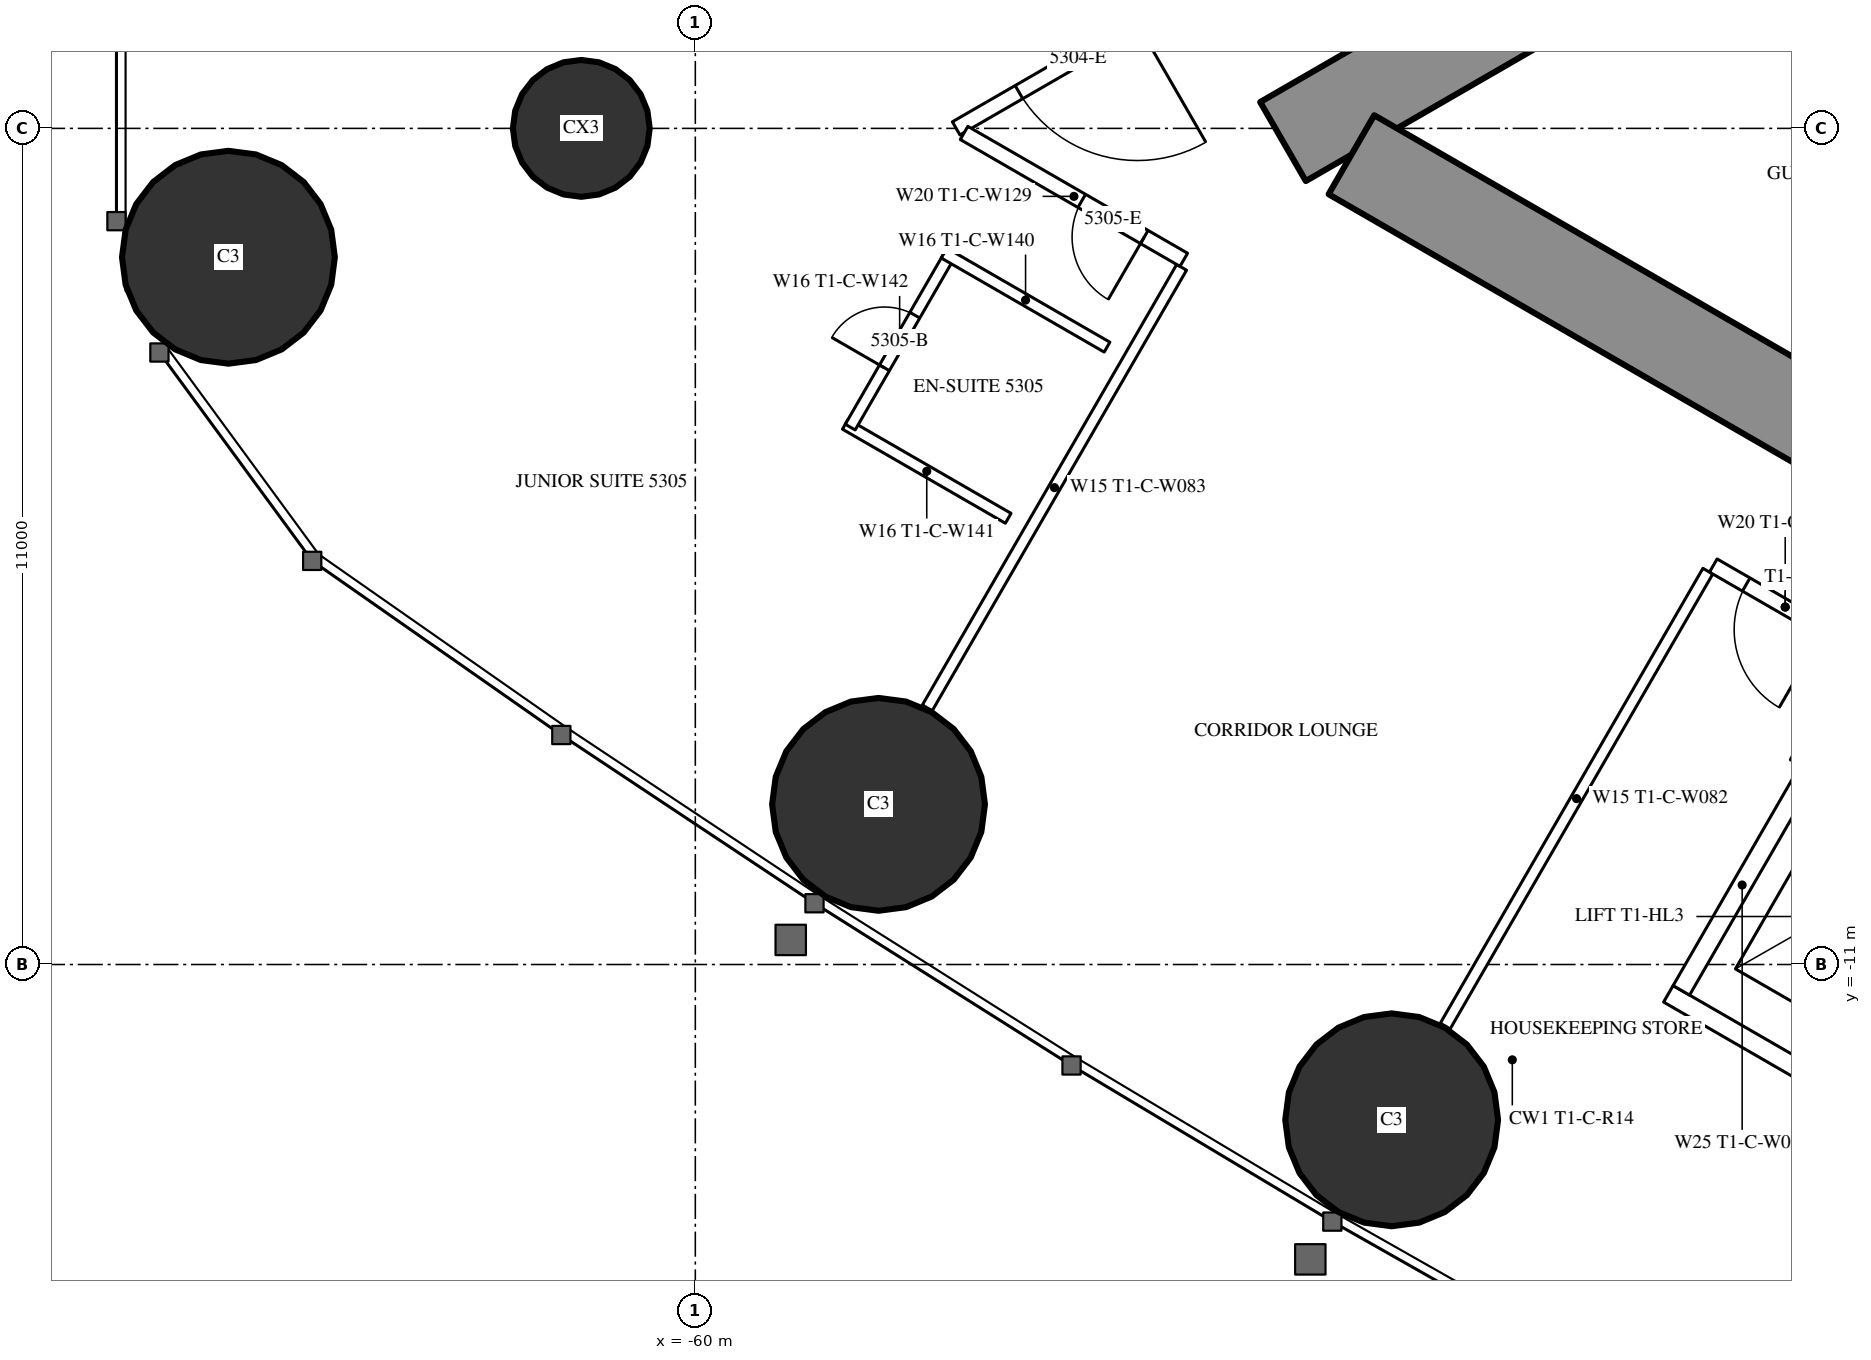
"""IFC4 building model, lengths in metres.
Left out: names, types, materials, properties, quantities, classifications, styles, units other than length and angle.
Written with IfcOpenShell. Run it as: python <this file> out.ifc"""

import sys

from ifc_helpers import new_model, si_unit, direction, frame, frame_2d, origin, origin_2d, place, context, subcontext, project, spatial, rectangle, circle, extrude, element, fill, save


model = new_model("IFC4")
c1 = context("Model", 3, precision=1e-05, world=origin(), true_north=direction((0.0, 1.0)))
c2 = subcontext(c1, "Body", "Model", "MODEL_VIEW")
j1 = project(units=[si_unit("LENGTHUNIT", "METRE"), si_unit("PLANEANGLEUNIT", "RADIAN")], contexts=[c1])
p1 = place(None, origin())
s1 = spatial("IfcSite", under=j1, at=p1, CompositionType="ELEMENT")
p2 = place(p1, origin())
s2 = spatial("IfcBuilding", under=s1, at=p2, CompositionType="ELEMENT")
p3 = place(p2, frame((0.0, 0.0, 198.3)))
s3 = spatial("IfcBuildingStorey", under=s2, at=p3, CompositionType="ELEMENT", Elevation=198.3)
for number, where, z_axis, x_axis in (
    (1, (-66.143, -1.695, 0.0), (0.0, 0.0, 1.0), (1.0, 0.0, 0.0)),
    (2, (-57.59, -8.893, 0.0), (0.0, 0.0, 1.0), (1.0, 0.0, 0.0)),
    (3, (-50.839, -13.043, 0.0), (0.0, 0.0, 1.0), (1.0, 0.0, 0.0)),
):
    element("IfcColumn", number, at=place(p3, frame(where, z_axis=z_axis, x_axis=x_axis)), inside=s3, PredefinedType="COLUMN", context=c2, shape_type="SweptSolid", body=[
        extrude(circle(Radius=1.4, at=origin_2d()), origin(), (0.0, 0.0, 1.0), 3.5),
    ])
p4 = place(p3, frame((-61.5, 0.0, 0.0), z_axis=(0.0, 0.0, 1.0), x_axis=(1.0, 0.0, 0.0)))
e4 = element("IfcColumn", 4, at=p4, inside=s3, PredefinedType="COLUMN", context=c2, shape_type="SweptSolid", body=[
    extrude(circle(Radius=0.9, at=origin_2d()), origin(), (0.0, 0.0, 1.0), 3.5),
])
p5 = place(p3, frame((-27.2, 14.3, 0.0), z_axis=(0.0, 0.0, 1.0), x_axis=(-0.866026593062, -0.499997940104, 0.0)))
e5 = element("IfcWall", 5, at=p5, inside=s3, PredefinedType="SHEAR", context=c2, shape_type="SweptSolid", body=[
    extrude(rectangle(XDim=28.946, YDim=1.2, at=frame_2d((14.473, 0.0))), origin(), (0.0, 0.0, 1.0), 3.5),
])
p6 = place(p5, frame((4.6, 0.0, 0.0)))
e6 = element("IfcOpeningElement", 6, at=p6, cuts=e5, PredefinedType="OPENING", context=c2, shape_type="SweptSolid", body=[
    extrude(rectangle(XDim=1.0, YDim=2.2, at=frame_2d((0.5, 1.1))), frame((0.0, 0.61, 0.0), z_axis=(0.0, -1.0, 0.0), x_axis=(1.0, 0.0, 0.0)), (0.0, 0.0, 1.0), 1.22),
])
p7 = place(p5, frame((13.395, 0.0, 0.0)))
e7 = element("IfcOpeningElement", 7, at=p7, cuts=e5, PredefinedType="OPENING", context=c2, shape_type="SweptSolid", body=[
    extrude(rectangle(XDim=1.8, YDim=2.2, at=frame_2d((0.9, 1.1))), frame((0.0, 0.61, 0.0), z_axis=(0.0, -1.0, 0.0), x_axis=(1.0, 0.0, 0.0)), (0.0, 0.0, 1.0), 1.22),
])
p8 = place(p3, frame((-27.2, -14.3, 0.0), z_axis=(0.0, 0.0, 1.0), x_axis=(-0.866024021859, 0.500002393557, 0.0)))
e8 = element("IfcWall", 8, at=p8, inside=s3, PredefinedType="SHEAR", context=c2, shape_type="SweptSolid", body=[
    extrude(rectangle(XDim=27.907, YDim=1.2, at=frame_2d((13.954, 0.0))), origin(), (0.0, 0.0, 1.0), 3.5),
])
p9 = place(p8, frame((4.6, 0.0, 0.0)))
e9 = element("IfcOpeningElement", 9, at=p9, cuts=e8, PredefinedType="OPENING", context=c2, shape_type="SweptSolid", body=[
    extrude(rectangle(XDim=1.0, YDim=2.2, at=frame_2d((0.5, 1.1))), frame((0.0, 0.61, 0.0), z_axis=(0.0, -1.0, 0.0), x_axis=(1.0, 0.0, 0.0)), (0.0, 0.0, 1.0), 1.22),
])
p10 = place(p8, frame((13.395, 0.0, 0.0)))
e10 = element("IfcOpeningElement", 10, at=p10, cuts=e8, PredefinedType="OPENING", context=c2, shape_type="SweptSolid", body=[
    extrude(rectangle(XDim=1.8, YDim=2.2, at=frame_2d((0.9, 1.1))), frame((0.0, 0.61, 0.0), z_axis=(0.0, -1.0, 0.0), x_axis=(1.0, 0.0, 0.0)), (0.0, 0.0, 1.0), 1.22),
])
p11 = place(p3, frame((-27.86, 16.575, 0.0), z_axis=(0.0, 0.0, 1.0), x_axis=(-0.866025533911, -0.499999774615, 0.0)))
e11 = element("IfcWall", 11, at=p11, inside=s3, PredefinedType="PARTITIONING", context=c2, shape_type="SweptSolid", body=[
    extrude(rectangle(XDim=33.149, YDim=0.2, at=frame_2d((16.575, 0.0))), origin(), (0.0, 0.0, 1.0), 3.25),
])
p12 = place(p11, frame((3.75, 0.0, 0.0)))
e12 = element("IfcOpeningElement", 12, at=p12, cuts=e11, PredefinedType="OPENING", context=c2, shape_type="SweptSolid", body=[
    extrude(rectangle(XDim=1.0, YDim=2.2, at=frame_2d((0.5, 1.1))), frame((0.0, 0.11, 0.0), z_axis=(0.0, -1.0, 0.0), x_axis=(1.0, 0.0, 0.0)), (0.0, 0.0, 1.0), 0.22),
])
p13 = place(p11, frame((16.402, 0.0, 0.0)))
e13 = element("IfcOpeningElement", 13, at=p13, cuts=e11, PredefinedType="OPENING", context=c2, shape_type="SweptSolid", body=[
    extrude(rectangle(XDim=0.95, YDim=2.2, at=frame_2d((0.475, 1.1))), frame((0.0, 0.11, 0.0), z_axis=(0.0, -1.0, 0.0), x_axis=(1.0, 0.0, 0.0)), (0.0, 0.0, 1.0), 0.22),
])
p14 = place(p11, frame((22.047, 0.0, 0.0)))
e14 = element("IfcOpeningElement", 14, at=p14, cuts=e11, PredefinedType="OPENING", context=c2, shape_type="SweptSolid", body=[
    extrude(rectangle(XDim=0.95, YDim=2.2, at=frame_2d((0.475, 1.1))), frame((0.0, 0.11, 0.0), z_axis=(0.0, -1.0, 0.0), x_axis=(1.0, 0.0, 0.0)), (0.0, 0.0, 1.0), 0.22),
])
p15 = place(p11, frame((30.396, 0.0, 0.0)))
e15 = element("IfcOpeningElement", 15, at=p15, cuts=e11, PredefinedType="OPENING", context=c2, shape_type="SweptSolid", body=[
    extrude(rectangle(XDim=1.8, YDim=2.2, at=frame_2d((0.9, 1.1))), frame((0.0, 0.11, 0.0), z_axis=(0.0, -1.0, 0.0), x_axis=(1.0, 0.0, 0.0)), (0.0, 0.0, 1.0), 0.22),
])
p16 = place(p3, frame((-46.679, -5.825, 0.0), z_axis=(0.0, 0.0, 1.0), x_axis=(-0.500006839597, -0.866021454905, 0.0)))
e16 = element("IfcWall", 16, at=p16, inside=s3, PredefinedType="PARTITIONING", context=c2, shape_type="SweptSolid", body=[
    extrude(rectangle(XDim=6.911, YDim=0.15, at=frame_2d((3.456, 0.0))), origin(), (0.0, 0.0, 1.0), 2.3),
])
p17 = place(p3, frame((-53.602, -1.828, 0.0), z_axis=(0.0, 0.0, 1.0), x_axis=(-0.49999191814, -0.866030069798, 0.0)))
e17 = element("IfcWall", 17, at=p17, inside=s3, PredefinedType="PARTITIONING", context=c2, shape_type="SweptSolid", body=[
    extrude(rectangle(XDim=6.692, YDim=0.15, at=frame_2d((3.346, 0.0))), origin(), (0.0, 0.0, 1.0), 2.3),
])
p18 = place(p3, frame((-44.652, -6.764, 0.0), z_axis=(0.0, 0.0, 1.0), x_axis=(-0.485424724123, -0.874278466629, 0.0)))
e18 = element("IfcWall", 18, at=p18, inside=s3, PredefinedType="PARTITIONING", context=c2, shape_type="SweptSolid", body=[
    extrude(rectangle(XDim=1.805, YDim=0.15, at=frame_2d((0.903, 0.0))), origin(), (0.0, 0.0, 1.0), 3.25),
])
p19 = place(p3, frame((-44.715, -6.844, 0.0), z_axis=(0.0, 0.0, 1.0), x_axis=(-0.865999496279, 0.500044870432, 0.0)))
e19 = element("IfcWall", 19, at=p19, inside=s3, PredefinedType="PARTITIONING", context=c2, shape_type="SweptSolid", body=[
    extrude(rectangle(XDim=2.185, YDim=0.2, at=frame_2d((1.092, 0.0))), origin(), (0.0, 0.0, 1.0), 3.25),
])
p20 = place(p19, frame((0.5, 0.0, 0.0)))
e20 = element("IfcOpeningElement", 20, at=p20, cuts=e19, PredefinedType="OPENING", context=c2, shape_type="SweptSolid", body=[
    extrude(rectangle(XDim=1.185, YDim=2.2, at=frame_2d((0.593, 1.1))), frame((0.0, 0.11, 0.0), z_axis=(0.0, -1.0, 0.0), x_axis=(1.0, 0.0, 0.0)), (0.0, 0.0, 1.0), 0.22),
])
p21 = place(p3, frame((-53.574, -1.729, 0.0), z_axis=(0.0, 0.0, 1.0), x_axis=(-0.866019930389, 0.500009480079, 0.0)))
e21 = element("IfcWall", 21, at=p21, inside=s3, PredefinedType="PARTITIONING", context=c2, shape_type="SweptSolid", body=[
    extrude(rectangle(XDim=3.338, YDim=0.2, at=frame_2d((1.669, 0.0))), origin(), (0.0, 0.0, 1.0), 3.25),
])
p22 = place(p21, frame((0.6, 0.0, 0.0)))
e22 = element("IfcOpeningElement", 22, at=p22, cuts=e21, PredefinedType="OPENING", context=c2, shape_type="SweptSolid", body=[
    extrude(rectangle(XDim=0.95, YDim=2.2, at=frame_2d((0.475, 1.1))), frame((0.0, 0.11, 0.0), z_axis=(0.0, -1.0, 0.0), x_axis=(1.0, 0.0, 0.0)), (0.0, 0.0, 1.0), 0.22),
])
p23 = place(p3, frame((-55.884, -5.13, 0.0), z_axis=(0.0, 0.0, 1.0), x_axis=(-0.866006523861, 0.500032699561, 0.0)))
e23 = element("IfcWall", 23, at=p23, inside=s3, PredefinedType="PARTITIONING", context=c2, shape_type="SweptSolid", body=[
    extrude(rectangle(XDim=2.475, YDim=0.15, at=frame_2d((1.237, 0.0))), origin(), (0.0, 0.0, 1.0), 3.25),
])
p24 = place(p3, frame((-56.662, -1.678, 0.0), z_axis=(0.0, 0.0, 1.0), x_axis=(-0.500006934395, -0.866021400173, 0.0)))
e24 = element("IfcWall", 24, at=p24, inside=s3, PredefinedType="PARTITIONING", context=c2, shape_type="SweptSolid", body=[
    extrude(rectangle(XDim=2.6, YDim=0.15, at=frame_2d((1.3, 0.0))), origin(), (0.0, 0.0, 1.0), 3.25),
])
p25 = place(p24, frame((0.9, 0.0, 0.0)))
e25 = element("IfcOpeningElement", 25, at=p25, cuts=e24, PredefinedType="OPENING", context=c2, shape_type="SweptSolid", body=[
    extrude(rectangle(XDim=0.8, YDim=2.2, at=frame_2d((0.4, 1.1))), frame((0.0, 0.085, 0.0), z_axis=(0.0, -1.0, 0.0), x_axis=(1.0, 0.0, 0.0)), (0.0, 0.0, 1.0), 0.17),
])
p26 = place(p3, frame((-54.583, -2.878, 0.0), z_axis=(0.0, 0.0, 1.0), x_axis=(-0.866006523861, 0.500032699561, 0.0)))
e26 = element("IfcWall", 26, at=p26, inside=s3, PredefinedType="PARTITIONING", context=c2, shape_type="SweptSolid", body=[
    extrude(rectangle(XDim=2.475, YDim=0.15, at=frame_2d((1.237, 0.0))), origin(), (0.0, 0.0, 1.0), 3.25),
])
p27 = place(p3, frame((-41.482, -14.686, 0.0), z_axis=(0.0, 0.0, 1.0), x_axis=(-0.86603344179, 0.499986077507, 0.0)))
e27 = element("IfcWall", 27, at=p27, inside=s3, PredefinedType="PARTITIONING", context=c2, shape_type="SweptSolid", body=[
    extrude(rectangle(XDim=6.6, YDim=0.25, at=frame_2d((3.3, 0.0))), origin(), (0.0, 0.0, 1.0), 3.25),
])
p28 = place(p3, frame((-45.428, -8.568, 0.0), z_axis=(0.0, 0.0, 1.0), x_axis=(-0.499929347863, -0.866066190972, 0.0)))
e28 = element("IfcWall", 28, at=p28, inside=s3, PredefinedType="PARTITIONING", context=c2, shape_type="SweptSolid", body=[
    extrude(rectangle(XDim=3.201, YDim=0.25, at=frame_2d((1.6, 0.0))), origin(), (0.0, 0.0, 1.0), 3.25),
])
p29 = place(p15, origin())
e29 = element("IfcDoor", 29, at=p29, inside=s3, OperationType="DOUBLE_DOOR_SINGLE_SWING", PredefinedType="DOOR", context=c2, shape_type="SweptSolid", body=[
    extrude(rectangle(XDim=1.8, YDim=2.2, at=frame_2d((0.9, 1.1))), frame((0.0, 0.025, 0.0), z_axis=(0.0, -1.0, 0.0), x_axis=(1.0, 0.0, 0.0)), (0.0, 0.0, 1.0), 0.05),
])
fill(e15, e29)
p30 = place(p25, origin())
e30 = element("IfcDoor", 30, at=p30, inside=s3, OperationType="SINGLE_SWING_RIGHT", PredefinedType="DOOR", context=c2, shape_type="SweptSolid", body=[
    extrude(rectangle(XDim=0.8, YDim=2.2, at=frame_2d((0.4, 1.1))), frame((0.0, 0.025, 0.0), z_axis=(0.0, -1.0, 0.0), x_axis=(1.0, 0.0, 0.0)), (0.0, 0.0, 1.0), 0.05),
])
fill(e25, e30)
p31 = place(p22, origin())
e31 = element("IfcDoor", 31, at=p31, inside=s3, OperationType="SINGLE_SWING_LEFT", PredefinedType="DOOR", context=c2, shape_type="SweptSolid", body=[
    extrude(rectangle(XDim=0.95, YDim=2.2, at=frame_2d((0.475, 1.1))), frame((0.0, 0.025, 0.0), z_axis=(0.0, -1.0, 0.0), x_axis=(1.0, 0.0, 0.0)), (0.0, 0.0, 1.0), 0.05),
])
fill(e22, e31)
p32 = place(p20, origin())
e32 = element("IfcDoor", 32, at=p32, inside=s3, OperationType="SINGLE_SWING_LEFT", PredefinedType="DOOR", context=c2, shape_type="SweptSolid", body=[
    extrude(rectangle(XDim=1.185, YDim=2.2, at=frame_2d((0.593, 1.1))), frame((0.0, 0.025, 0.0), z_axis=(0.0, -1.0, 0.0), x_axis=(1.0, 0.0, 0.0)), (0.0, 0.0, 1.0), 0.05),
])
fill(e20, e32)
save(model, sys.argv[1])
